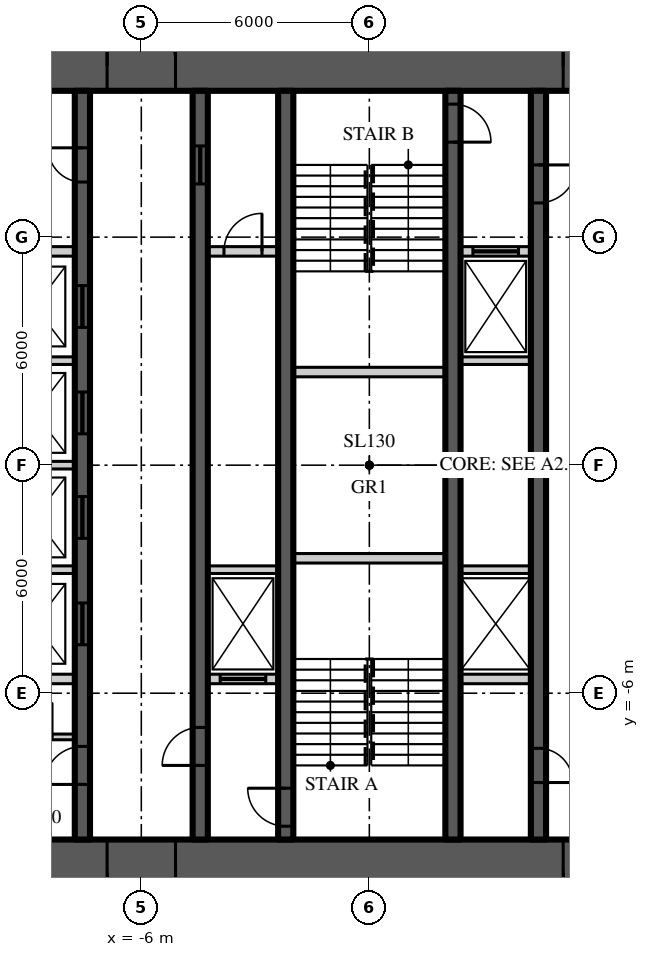
"""IFC4 building model, lengths in metres.
Left out: names, types, materials, properties, quantities, classifications, styles, units other than length and angle.
Written with IfcOpenShell. Run it as: python <this file> out.ifc"""

import sys

from ifc_helpers import new_model, si_unit, direction, frame, frame_2d, origin, place, context, subcontext, project, spatial, rectangle, extrude, element, fill, save


model = new_model("IFC4")
c1 = context("Model", 3, precision=1e-05, world=origin(), true_north=direction((0.0, 1.0)))
c2 = subcontext(c1, "Body", "Model", "MODEL_VIEW")
j1 = project(units=[si_unit("LENGTHUNIT", "METRE"), si_unit("PLANEANGLEUNIT", "RADIAN")], contexts=[c1])
p1 = place(None, origin())
s1 = spatial("IfcSite", under=j1, at=p1, CompositionType="ELEMENT")
p2 = place(p1, origin())
s2 = spatial("IfcBuilding", under=s1, at=p2, CompositionType="ELEMENT")
p3 = place(p2, frame((0.0, 0.0, 78.6)))
s3 = spatial("IfcBuildingStorey", under=s2, at=p3, CompositionType="ELEMENT", Elevation=78.6)
p4 = place(p3, frame((-11.15, 10.5, 0.0), z_axis=(0.0, 0.0, 1.0), x_axis=(1.0, 0.0, 0.0)))
e1 = element("IfcWall", 1, at=p4, inside=s3, PredefinedType="SHEAR", context=c2, shape_type="SweptSolid", body=[
    extrude(rectangle(XDim=22.3, YDim=1.3, at=frame_2d((11.15, 0.0))), origin(), (0.0, 0.0, 1.0), 3.9),
])
p5 = place(p4, frame((4.25, 0.0, 0.0)))
e2 = element("IfcOpeningElement", 2, at=p5, cuts=e1, PredefinedType="OPENING", context=c2, shape_type="SweptSolid", body=[
    extrude(rectangle(XDim=1.8, YDim=2.2, at=frame_2d((0.9, 1.1))), frame((0.0, 0.66, 0.0), z_axis=(0.0, -1.0, 0.0), x_axis=(1.0, 0.0, 0.0)), (0.0, 0.0, 1.0), 1.32),
])
p6 = place(p4, frame((16.25, 0.0, 0.0)))
e3 = element("IfcOpeningElement", 3, at=p6, cuts=e1, PredefinedType="OPENING", context=c2, shape_type="SweptSolid", body=[
    extrude(rectangle(XDim=1.8, YDim=2.2, at=frame_2d((0.9, 1.1))), frame((0.0, 0.66, 0.0), z_axis=(0.0, -1.0, 0.0), x_axis=(1.0, 0.0, 0.0)), (0.0, 0.0, 1.0), 1.32),
])
p7 = place(p3, frame((11.15, -10.5, 0.0), z_axis=(0.0, 0.0, 1.0), x_axis=(-1.0, 0.0, 0.0)))
e4 = element("IfcWall", 4, at=p7, inside=s3, PredefinedType="SHEAR", context=c2, shape_type="SweptSolid", body=[
    extrude(rectangle(XDim=22.3, YDim=1.3, at=frame_2d((11.15, 0.0))), origin(), (0.0, 0.0, 1.0), 3.9),
])
p8 = place(p7, frame((16.25, 0.0, 0.0)))
e5 = element("IfcOpeningElement", 5, at=p8, cuts=e4, PredefinedType="OPENING", context=c2, shape_type="SweptSolid", body=[
    extrude(rectangle(XDim=1.8, YDim=2.2, at=frame_2d((0.9, 1.1))), frame((0.0, 0.66, 0.0), z_axis=(0.0, -1.0, 0.0), x_axis=(1.0, 0.0, 0.0)), (0.0, 0.0, 1.0), 1.32),
])
p9 = place(p7, frame((4.25, 0.0, 0.0)))
e6 = element("IfcOpeningElement", 6, at=p9, cuts=e4, PredefinedType="OPENING", context=c2, shape_type="SweptSolid", body=[
    extrude(rectangle(XDim=1.8, YDim=2.2, at=frame_2d((0.9, 1.1))), frame((0.0, 0.66, 0.0), z_axis=(0.0, -1.0, 0.0), x_axis=(1.0, 0.0, 0.0)), (0.0, 0.0, 1.0), 1.32),
])
p10 = place(p3, frame((-7.55, -9.85, 0.0), z_axis=(0.0, 0.0, 1.0), x_axis=(0.0, 1.0, 0.0)))
e7 = element("IfcWall", 7, at=p10, inside=s3, PredefinedType="SHEAR", context=c2, shape_type="SweptSolid", body=[
    extrude(rectangle(XDim=19.7, YDim=0.4, at=frame_2d((9.85, 0.0))), origin(), (0.0, 0.0, 1.0), 3.9),
])
p11 = place(p10, frame((1.45, 0.0, 0.0)))
e8 = element("IfcOpeningElement", 8, at=p11, cuts=e7, PredefinedType="OPENING", context=c2, shape_type="SweptSolid", body=[
    extrude(rectangle(XDim=1.0, YDim=2.2, at=frame_2d((0.5, 1.1))), frame((0.0, 0.21, 0.0), z_axis=(0.0, -1.0, 0.0), x_axis=(1.0, 0.0, 0.0)), (0.0, 0.0, 1.0), 0.42),
])
p12 = place(p10, frame((17.3, 0.0, 0.0)))
e9 = element("IfcOpeningElement", 9, at=p12, cuts=e7, PredefinedType="OPENING", context=c2, shape_type="SweptSolid", body=[
    extrude(rectangle(XDim=0.9, YDim=2.1, at=frame_2d((0.45, 1.05))), frame((0.0, 0.21, 0.0), z_axis=(0.0, -1.0, 0.0), x_axis=(1.0, 0.0, 0.0)), (0.0, 0.0, 1.0), 0.42),
])
p13 = place(p10, frame((5.125, 0.0, 0.0)))
e10 = element("IfcOpeningElement", 10, at=p13, cuts=e7, PredefinedType="OPENING", context=c2, shape_type="SweptSolid", body=[
    extrude(rectangle(XDim=1.1, YDim=2.2, at=frame_2d((0.55, 1.1))), frame((0.0, 0.21, 0.0), z_axis=(0.0, -1.0, 0.0), x_axis=(1.0, 0.0, 0.0)), (0.0, 0.0, 1.0), 0.42),
])
p14 = place(p10, frame((7.925, 0.0, 0.0)))
e11 = element("IfcOpeningElement", 11, at=p14, cuts=e7, PredefinedType="OPENING", context=c2, shape_type="SweptSolid", body=[
    extrude(rectangle(XDim=1.1, YDim=2.2, at=frame_2d((0.55, 1.1))), frame((0.0, 0.21, 0.0), z_axis=(0.0, -1.0, 0.0), x_axis=(1.0, 0.0, 0.0)), (0.0, 0.0, 1.0), 0.42),
])
p15 = place(p10, frame((10.675, 0.0, 0.0)))
e12 = element("IfcOpeningElement", 12, at=p15, cuts=e7, PredefinedType="OPENING", context=c2, shape_type="SweptSolid", body=[
    extrude(rectangle(XDim=1.1, YDim=2.2, at=frame_2d((0.55, 1.1))), frame((0.0, 0.21, 0.0), z_axis=(0.0, -1.0, 0.0), x_axis=(1.0, 0.0, 0.0)), (0.0, 0.0, 1.0), 0.42),
])
p16 = place(p10, frame((13.475, 0.0, 0.0)))
e13 = element("IfcOpeningElement", 13, at=p16, cuts=e7, PredefinedType="OPENING", context=c2, shape_type="SweptSolid", body=[
    extrude(rectangle(XDim=1.1, YDim=2.2, at=frame_2d((0.55, 1.1))), frame((0.0, 0.21, 0.0), z_axis=(0.0, -1.0, 0.0), x_axis=(1.0, 0.0, 0.0)), (0.0, 0.0, 1.0), 0.42),
])
p17 = place(p3, frame((-4.45, -9.85, 0.0), z_axis=(0.0, 0.0, 1.0), x_axis=(0.0, 1.0, 0.0)))
e14 = element("IfcWall", 14, at=p17, inside=s3, PredefinedType="SHEAR", context=c2, shape_type="SweptSolid", body=[
    extrude(rectangle(XDim=19.7, YDim=0.4, at=frame_2d((9.85, 0.0))), origin(), (0.0, 0.0, 1.0), 3.9),
])
p18 = place(p17, frame((1.95, 0.0, 0.0)))
e15 = element("IfcOpeningElement", 15, at=p18, cuts=e14, PredefinedType="OPENING", context=c2, shape_type="SweptSolid", body=[
    extrude(rectangle(XDim=1.0, YDim=2.2, at=frame_2d((0.5, 1.1))), frame((0.0, 0.21, 0.0), z_axis=(0.0, -1.0, 0.0), x_axis=(1.0, 0.0, 0.0)), (0.0, 0.0, 1.0), 0.42),
])
p19 = place(p17, frame((17.25, 0.0, 0.0)))
e16 = element("IfcOpeningElement", 16, at=p19, cuts=e14, PredefinedType="OPENING", context=c2, shape_type="SweptSolid", body=[
    extrude(rectangle(XDim=1.0, YDim=2.1, at=frame_2d((0.5, 1.05))), frame((0.0, 0.21, 0.0), z_axis=(0.0, -1.0, 0.0), x_axis=(1.0, 0.0, 0.0)), (0.0, 0.0, 1.0), 0.42),
])
p20 = place(p3, frame((4.45, 9.85, 0.0), z_axis=(0.0, 0.0, 1.0), x_axis=(0.0, -1.0, 0.0)))
e17 = element("IfcWall", 17, at=p20, inside=s3, PredefinedType="SHEAR", context=c2, shape_type="SweptSolid", body=[
    extrude(rectangle(XDim=19.7, YDim=0.4, at=frame_2d((9.85, 0.0))), origin(), (0.0, 0.0, 1.0), 3.9),
])
p21 = place(p20, frame((1.95, 0.0, 0.0)))
e18 = element("IfcOpeningElement", 18, at=p21, cuts=e17, PredefinedType="OPENING", context=c2, shape_type="SweptSolid", body=[
    extrude(rectangle(XDim=1.0, YDim=2.2, at=frame_2d((0.5, 1.1))), frame((0.0, 0.21, 0.0), z_axis=(0.0, -1.0, 0.0), x_axis=(1.0, 0.0, 0.0)), (0.0, 0.0, 1.0), 0.42),
])
p22 = place(p20, frame((17.3, 0.0, 0.0)))
e19 = element("IfcOpeningElement", 19, at=p22, cuts=e17, PredefinedType="OPENING", context=c2, shape_type="SweptSolid", body=[
    extrude(rectangle(XDim=0.9, YDim=2.1, at=frame_2d((0.45, 1.05))), frame((0.0, 0.21, 0.0), z_axis=(0.0, -1.0, 0.0), x_axis=(1.0, 0.0, 0.0)), (0.0, 0.0, 1.0), 0.42),
])
p23 = place(p3, frame((-2.2, -9.85, 0.0), z_axis=(0.0, 0.0, 1.0), x_axis=(0.0, 1.0, 0.0)))
e20 = element("IfcWall", 20, at=p23, inside=s3, PredefinedType="SHEAR", context=c2, shape_type="SweptSolid", body=[
    extrude(rectangle(XDim=19.7, YDim=0.4, at=frame_2d((9.85, 0.0))), origin(), (0.0, 0.0, 1.0), 3.9),
])
p24 = place(p23, frame((0.35, 0.0, 0.0)))
e21 = element("IfcOpeningElement", 21, at=p24, cuts=e20, PredefinedType="OPENING", context=c2, shape_type="SweptSolid", body=[
    extrude(rectangle(XDim=1.0, YDim=2.2, at=frame_2d((0.5, 1.1))), frame((0.0, 0.21, 0.0), z_axis=(0.0, -1.0, 0.0), x_axis=(1.0, 0.0, 0.0)), (0.0, 0.0, 1.0), 0.42),
])
p25 = place(p3, frame((2.2, 9.85, 0.0), z_axis=(0.0, 0.0, 1.0), x_axis=(0.0, -1.0, 0.0)))
e22 = element("IfcWall", 22, at=p25, inside=s3, PredefinedType="SHEAR", context=c2, shape_type="SweptSolid", body=[
    extrude(rectangle(XDim=19.7, YDim=0.4, at=frame_2d((9.85, 0.0))), origin(), (0.0, 0.0, 1.0), 3.9),
])
p26 = place(p25, frame((0.35, 0.0, 0.0)))
e23 = element("IfcOpeningElement", 23, at=p26, cuts=e22, PredefinedType="OPENING", context=c2, shape_type="SweptSolid", body=[
    extrude(rectangle(XDim=1.0, YDim=2.2, at=frame_2d((0.5, 1.1))), frame((0.0, 0.21, 0.0), z_axis=(0.0, -1.0, 0.0), x_axis=(1.0, 0.0, 0.0)), (0.0, 0.0, 1.0), 0.42),
])
p27 = place(p3, frame((-9.85, 5.625, 0.0), z_axis=(0.0, 0.0, 1.0), x_axis=(1.0, 0.0, 0.0)))
e24 = element("IfcWall", 24, at=p27, inside=s3, PredefinedType="SOLIDWALL", context=c2, shape_type="SweptSolid", body=[
    extrude(rectangle(XDim=2.1, YDim=0.25, at=frame_2d((1.05, 0.0))), origin(), (0.0, 0.0, 1.0), 3.7),
])
p28 = place(p3, frame((-4.25, 5.625, 0.0), z_axis=(0.0, 0.0, 1.0), x_axis=(1.0, 0.0, 0.0)))
e25 = element("IfcWall", 25, at=p28, inside=s3, PredefinedType="SOLIDWALL", context=c2, shape_type="SweptSolid", body=[
    extrude(rectangle(XDim=1.85, YDim=0.25, at=frame_2d((0.925, 0.0))), origin(), (0.0, 0.0, 1.0), 3.7),
])
p29 = place(p28, frame((0.425, 0.0, 0.0)))
e26 = element("IfcOpeningElement", 26, at=p29, cuts=e25, PredefinedType="OPENING", context=c2, shape_type="SweptSolid", body=[
    extrude(rectangle(XDim=1.0, YDim=2.2, at=frame_2d((0.5, 1.1))), frame((0.0, 0.135, 0.0), z_axis=(0.0, -1.0, 0.0), x_axis=(1.0, 0.0, 0.0)), (0.0, 0.0, 1.0), 0.27),
])
p30 = place(p3, frame((2.4, 5.625, 0.0), z_axis=(0.0, 0.0, 1.0), x_axis=(1.0, 0.0, 0.0)))
e27 = element("IfcWall", 27, at=p30, inside=s3, PredefinedType="SOLIDWALL", context=c2, shape_type="SweptSolid", body=[
    extrude(rectangle(XDim=1.85, YDim=0.25, at=frame_2d((0.925, 0.0))), origin(), (0.0, 0.0, 1.0), 3.7),
])
p31 = place(p30, frame((0.325, 0.0, 0.0)))
e28 = element("IfcOpeningElement", 28, at=p31, cuts=e27, PredefinedType="OPENING", context=c2, shape_type="SweptSolid", body=[
    extrude(rectangle(XDim=1.2, YDim=2.2, at=frame_2d((0.6, 1.1))), frame((0.0, 0.135, 0.0), z_axis=(0.0, -1.0, 0.0), x_axis=(1.0, 0.0, 0.0)), (0.0, 0.0, 1.0), 0.27),
])
p32 = place(p3, frame((-9.85, -5.625, 0.0), z_axis=(0.0, 0.0, 1.0), x_axis=(1.0, 0.0, 0.0)))
e29 = element("IfcWall", 29, at=p32, inside=s3, PredefinedType="SOLIDWALL", context=c2, shape_type="SweptSolid", body=[
    extrude(rectangle(XDim=2.1, YDim=0.25, at=frame_2d((1.05, 0.0))), origin(), (0.0, 0.0, 1.0), 3.7),
])
p33 = place(p3, frame((-4.25, -5.625, 0.0), z_axis=(0.0, 0.0, 1.0), x_axis=(1.0, 0.0, 0.0)))
e30 = element("IfcWall", 30, at=p33, inside=s3, PredefinedType="SOLIDWALL", context=c2, shape_type="SweptSolid", body=[
    extrude(rectangle(XDim=1.85, YDim=0.25, at=frame_2d((0.925, 0.0))), origin(), (0.0, 0.0, 1.0), 3.7),
])
p34 = place(p33, frame((0.325, 0.0, 0.0)))
e31 = element("IfcOpeningElement", 31, at=p34, cuts=e30, PredefinedType="OPENING", context=c2, shape_type="SweptSolid", body=[
    extrude(rectangle(XDim=1.2, YDim=2.2, at=frame_2d((0.6, 1.1))), frame((0.0, 0.135, 0.0), z_axis=(0.0, -1.0, 0.0), x_axis=(1.0, 0.0, 0.0)), (0.0, 0.0, 1.0), 0.27),
])
p35 = place(p3, frame((2.4, -5.625, 0.0), z_axis=(0.0, 0.0, 1.0), x_axis=(1.0, 0.0, 0.0)))
e32 = element("IfcWall", 32, at=p35, inside=s3, PredefinedType="SOLIDWALL", context=c2, shape_type="SweptSolid", body=[
    extrude(rectangle(XDim=1.85, YDim=0.25, at=frame_2d((0.925, 0.0))), origin(), (0.0, 0.0, 1.0), 3.7),
])
for number, where, z_axis, x_axis in (
    (33, (-2.0, -2.45, 0.0), (0.0, 0.0, 1.0), (1.0, 0.0, 0.0)),
    (34, (-2.0, 2.45, 0.0), (0.0, 0.0, 1.0), (1.0, 0.0, 0.0)),
):
    element("IfcWall", number, at=place(p3, frame(where, z_axis=z_axis, x_axis=x_axis)), inside=s3, PredefinedType="SOLIDWALL", context=c2, shape_type="SweptSolid", body=[
        extrude(rectangle(XDim=4.0, YDim=0.25, at=frame_2d((2.0, 0.0))), origin(), (0.0, 0.0, 1.0), 3.7),
    ])
p36 = place(p3, frame((-9.85, -2.75, 0.0), z_axis=(0.0, 0.0, 1.0), x_axis=(1.0, 0.0, 0.0)))
e35 = element("IfcWall", 35, at=p36, inside=s3, PredefinedType="SOLIDWALL", context=c2, shape_type="SweptSolid", body=[
    extrude(rectangle(XDim=2.1, YDim=0.2, at=frame_2d((1.05, 0.0))), origin(), (0.0, 0.0, 1.0), 3.7),
])
for number, where, z_axis, x_axis in (
    (36, (-4.25, -2.75, 0.0), (0.0, 0.0, 1.0), (1.0, 0.0, 0.0)),
    (37, (2.4, -2.75, 0.0), (0.0, 0.0, 1.0), (1.0, 0.0, 0.0)),
):
    element("IfcWall", number, at=place(p3, frame(where, z_axis=z_axis, x_axis=x_axis)), inside=s3, PredefinedType="SOLIDWALL", context=c2, shape_type="SweptSolid", body=[
        extrude(rectangle(XDim=1.85, YDim=0.2, at=frame_2d((0.925, 0.0))), origin(), (0.0, 0.0, 1.0), 3.7),
    ])
for number, where, z_axis, x_axis in (
    (38, (-9.85, 0.0, 0.0), (0.0, 0.0, 1.0), (1.0, 0.0, 0.0)),
    (39, (-9.85, 2.75, 0.0), (0.0, 0.0, 1.0), (1.0, 0.0, 0.0)),
):
    element("IfcWall", number, at=place(p3, frame(where, z_axis=z_axis, x_axis=x_axis)), inside=s3, PredefinedType="SOLIDWALL", context=c2, shape_type="SweptSolid", body=[
        extrude(rectangle(XDim=2.1, YDim=0.2, at=frame_2d((1.05, 0.0))), origin(), (0.0, 0.0, 1.0), 3.7),
    ])
p37 = place(p3, frame((2.4, 2.75, 0.0), z_axis=(0.0, 0.0, 1.0), x_axis=(1.0, 0.0, 0.0)))
e40 = element("IfcWall", 40, at=p37, inside=s3, PredefinedType="SOLIDWALL", context=c2, shape_type="SweptSolid", body=[
    extrude(rectangle(XDim=1.85, YDim=0.2, at=frame_2d((0.925, 0.0))), origin(), (0.0, 0.0, 1.0), 3.7),
])
p38 = place(p3, frame((-9.85, -7.15, 0.0), z_axis=(0.0, 0.0, 1.0), x_axis=(1.0, 0.0, 0.0)))
e41 = element("IfcWall", 41, at=p38, inside=s3, PredefinedType="SOLIDWALL", context=c2, shape_type="SweptSolid", body=[
    extrude(rectangle(XDim=2.1, YDim=0.15, at=frame_2d((1.05, 0.0))), origin(), (0.0, 0.0, 1.0), 3.77),
])
p39 = place(p38, frame((0.6, 0.0, 0.0)))
e42 = element("IfcOpeningElement", 42, at=p39, cuts=e41, PredefinedType="OPENING", context=c2, shape_type="SweptSolid", body=[
    extrude(rectangle(XDim=0.9, YDim=2.1, at=frame_2d((0.45, 1.05))), frame((0.0, 0.085, 0.0), z_axis=(0.0, -1.0, 0.0), x_axis=(1.0, 0.0, 0.0)), (0.0, 0.0, 1.0), 0.17),
])
p40 = place(p5, origin())
e43 = element("IfcDoor", 43, at=p40, inside=s3, OperationType="DOUBLE_DOOR_DOUBLE_SWING", PredefinedType="DOOR", context=c2, shape_type="SweptSolid", body=[
    extrude(rectangle(XDim=1.8, YDim=2.2, at=frame_2d((0.9, 1.1))), frame((0.0, 0.025, 0.0), z_axis=(0.0, -1.0, 0.0), x_axis=(1.0, 0.0, 0.0)), (0.0, 0.0, 1.0), 0.05),
])
fill(e2, e43)
p41 = place(p8, origin())
e44 = element("IfcDoor", 44, at=p41, inside=s3, OperationType="DOUBLE_DOOR_DOUBLE_SWING", PredefinedType="DOOR", context=c2, shape_type="SweptSolid", body=[
    extrude(rectangle(XDim=1.8, YDim=2.2, at=frame_2d((0.9, 1.1))), frame((0.0, 0.025, 0.0), z_axis=(0.0, -1.0, 0.0), x_axis=(1.0, 0.0, 0.0)), (0.0, 0.0, 1.0), 0.05),
])
fill(e5, e44)
p42 = place(p6, origin())
e45 = element("IfcDoor", 45, at=p42, inside=s3, OperationType="DOUBLE_DOOR_DOUBLE_SWING", PredefinedType="DOOR", context=c2, shape_type="SweptSolid", body=[
    extrude(rectangle(XDim=1.8, YDim=2.2, at=frame_2d((0.9, 1.1))), frame((0.0, 0.025, 0.0), z_axis=(0.0, -1.0, 0.0), x_axis=(1.0, 0.0, 0.0)), (0.0, 0.0, 1.0), 0.05),
])
fill(e3, e45)
p43 = place(p9, origin())
e46 = element("IfcDoor", 46, at=p43, inside=s3, OperationType="DOUBLE_DOOR_DOUBLE_SWING", PredefinedType="DOOR", context=c2, shape_type="SweptSolid", body=[
    extrude(rectangle(XDim=1.8, YDim=2.2, at=frame_2d((0.9, 1.1))), frame((0.0, 0.025, 0.0), z_axis=(0.0, -1.0, 0.0), x_axis=(1.0, 0.0, 0.0)), (0.0, 0.0, 1.0), 0.05),
])
fill(e6, e46)
p44 = place(p11, origin())
e47 = element("IfcDoor", 47, at=p44, inside=s3, OperationType="SINGLE_SWING_LEFT", PredefinedType="DOOR", context=c2, shape_type="SweptSolid", body=[
    extrude(rectangle(XDim=1.0, YDim=2.2, at=frame_2d((0.5, 1.1))), frame((0.0, 0.025, 0.0), z_axis=(0.0, -1.0, 0.0), x_axis=(1.0, 0.0, 0.0)), (0.0, 0.0, 1.0), 0.05),
])
fill(e8, e47)
p45 = place(p18, origin())
e48 = element("IfcDoor", 48, at=p45, inside=s3, OperationType="SINGLE_SWING_LEFT", PredefinedType="DOOR", context=c2, shape_type="SweptSolid", body=[
    extrude(rectangle(XDim=1.0, YDim=2.2, at=frame_2d((0.5, 1.1))), frame((0.0, 0.025, 0.0), z_axis=(0.0, -1.0, 0.0), x_axis=(1.0, 0.0, 0.0)), (0.0, 0.0, 1.0), 0.05),
])
fill(e15, e48)
p46 = place(p24, origin())
e49 = element("IfcDoor", 49, at=p46, inside=s3, OperationType="SINGLE_SWING_RIGHT", PredefinedType="DOOR", context=c2, shape_type="SweptSolid", body=[
    extrude(rectangle(XDim=1.0, YDim=2.2, at=frame_2d((0.5, 1.1))), frame((0.0, 0.025, 0.0), z_axis=(0.0, -1.0, 0.0), x_axis=(1.0, 0.0, 0.0)), (0.0, 0.0, 1.0), 0.05),
])
fill(e21, e49)
p47 = place(p21, origin())
e50 = element("IfcDoor", 50, at=p47, inside=s3, OperationType="SINGLE_SWING_LEFT", PredefinedType="DOOR", context=c2, shape_type="SweptSolid", body=[
    extrude(rectangle(XDim=1.0, YDim=2.2, at=frame_2d((0.5, 1.1))), frame((0.0, 0.025, 0.0), z_axis=(0.0, -1.0, 0.0), x_axis=(1.0, 0.0, 0.0)), (0.0, 0.0, 1.0), 0.05),
])
fill(e18, e50)
p48 = place(p26, origin())
e51 = element("IfcDoor", 51, at=p48, inside=s3, OperationType="SINGLE_SWING_RIGHT", PredefinedType="DOOR", context=c2, shape_type="SweptSolid", body=[
    extrude(rectangle(XDim=1.0, YDim=2.2, at=frame_2d((0.5, 1.1))), frame((0.0, 0.025, 0.0), z_axis=(0.0, -1.0, 0.0), x_axis=(1.0, 0.0, 0.0)), (0.0, 0.0, 1.0), 0.05),
])
fill(e23, e51)
p49 = place(p12, origin())
e52 = element("IfcDoor", 52, at=p49, inside=s3, OperationType="SINGLE_SWING_RIGHT", PredefinedType="DOOR", context=c2, shape_type="SweptSolid", body=[
    extrude(rectangle(XDim=0.9, YDim=2.1, at=frame_2d((0.45, 1.05))), frame((0.0, 0.025, 0.0), z_axis=(0.0, -1.0, 0.0), x_axis=(1.0, 0.0, 0.0)), (0.0, 0.0, 1.0), 0.05),
])
fill(e9, e52)
p50 = place(p19, origin())
e53 = element("IfcDoor", 53, at=p50, inside=s3, OperationType="SLIDING_TO_LEFT", PredefinedType="DOOR", context=c2, shape_type="SweptSolid", body=[
    extrude(rectangle(XDim=1.0, YDim=2.1, at=frame_2d((0.5, 1.05))), frame((0.0, 0.025, 0.0), z_axis=(0.0, -1.0, 0.0), x_axis=(1.0, 0.0, 0.0)), (0.0, 0.0, 1.0), 0.05),
])
fill(e16, e53)
p51 = place(p22, origin())
e54 = element("IfcDoor", 54, at=p51, inside=s3, OperationType="SINGLE_SWING_RIGHT", PredefinedType="DOOR", context=c2, shape_type="SweptSolid", body=[
    extrude(rectangle(XDim=0.9, YDim=2.1, at=frame_2d((0.45, 1.05))), frame((0.0, 0.025, 0.0), z_axis=(0.0, -1.0, 0.0), x_axis=(1.0, 0.0, 0.0)), (0.0, 0.0, 1.0), 0.05),
])
fill(e19, e54)
p52 = place(p13, origin())
e55 = element("IfcDoor", 55, at=p52, inside=s3, OperationType="SLIDING_TO_LEFT", PredefinedType="DOOR", context=c2, shape_type="SweptSolid", body=[
    extrude(rectangle(XDim=1.1, YDim=2.2, at=frame_2d((0.55, 1.1))), frame((0.0, 0.025, 0.0), z_axis=(0.0, -1.0, 0.0), x_axis=(1.0, 0.0, 0.0)), (0.0, 0.0, 1.0), 0.05),
])
fill(e10, e55)
p53 = place(p14, origin())
e56 = element("IfcDoor", 56, at=p53, inside=s3, OperationType="SLIDING_TO_LEFT", PredefinedType="DOOR", context=c2, shape_type="SweptSolid", body=[
    extrude(rectangle(XDim=1.1, YDim=2.2, at=frame_2d((0.55, 1.1))), frame((0.0, 0.025, 0.0), z_axis=(0.0, -1.0, 0.0), x_axis=(1.0, 0.0, 0.0)), (0.0, 0.0, 1.0), 0.05),
])
fill(e11, e56)
p54 = place(p15, origin())
e57 = element("IfcDoor", 57, at=p54, inside=s3, OperationType="SLIDING_TO_LEFT", PredefinedType="DOOR", context=c2, shape_type="SweptSolid", body=[
    extrude(rectangle(XDim=1.1, YDim=2.2, at=frame_2d((0.55, 1.1))), frame((0.0, 0.025, 0.0), z_axis=(0.0, -1.0, 0.0), x_axis=(1.0, 0.0, 0.0)), (0.0, 0.0, 1.0), 0.05),
])
fill(e12, e57)
p55 = place(p16, origin())
e58 = element("IfcDoor", 58, at=p55, inside=s3, OperationType="SLIDING_TO_LEFT", PredefinedType="DOOR", context=c2, shape_type="SweptSolid", body=[
    extrude(rectangle(XDim=1.1, YDim=2.2, at=frame_2d((0.55, 1.1))), frame((0.0, 0.025, 0.0), z_axis=(0.0, -1.0, 0.0), x_axis=(1.0, 0.0, 0.0)), (0.0, 0.0, 1.0), 0.05),
])
fill(e13, e58)
p56 = place(p34, origin())
e59 = element("IfcDoor", 59, at=p56, inside=s3, OperationType="SLIDING_TO_LEFT", PredefinedType="DOOR", context=c2, shape_type="SweptSolid", body=[
    extrude(rectangle(XDim=1.2, YDim=2.2, at=frame_2d((0.6, 1.1))), frame((0.0, 0.025, 0.0), z_axis=(0.0, -1.0, 0.0), x_axis=(1.0, 0.0, 0.0)), (0.0, 0.0, 1.0), 0.05),
])
fill(e31, e59)
p57 = place(p31, origin())
e60 = element("IfcDoor", 60, at=p57, inside=s3, OperationType="SLIDING_TO_LEFT", PredefinedType="DOOR", context=c2, shape_type="SweptSolid", body=[
    extrude(rectangle(XDim=1.2, YDim=2.2, at=frame_2d((0.6, 1.1))), frame((0.0, 0.025, 0.0), z_axis=(0.0, -1.0, 0.0), x_axis=(1.0, 0.0, 0.0)), (0.0, 0.0, 1.0), 0.05),
])
fill(e28, e60)
p58 = place(p29, origin())
e61 = element("IfcDoor", 61, at=p58, inside=s3, OperationType="SINGLE_SWING_RIGHT", PredefinedType="DOOR", context=c2, shape_type="SweptSolid", body=[
    extrude(rectangle(XDim=1.0, YDim=2.2, at=frame_2d((0.5, 1.1))), frame((0.0, 0.025, 0.0), z_axis=(0.0, -1.0, 0.0), x_axis=(1.0, 0.0, 0.0)), (0.0, 0.0, 1.0), 0.05),
])
fill(e26, e61)
save(model, sys.argv[1])
